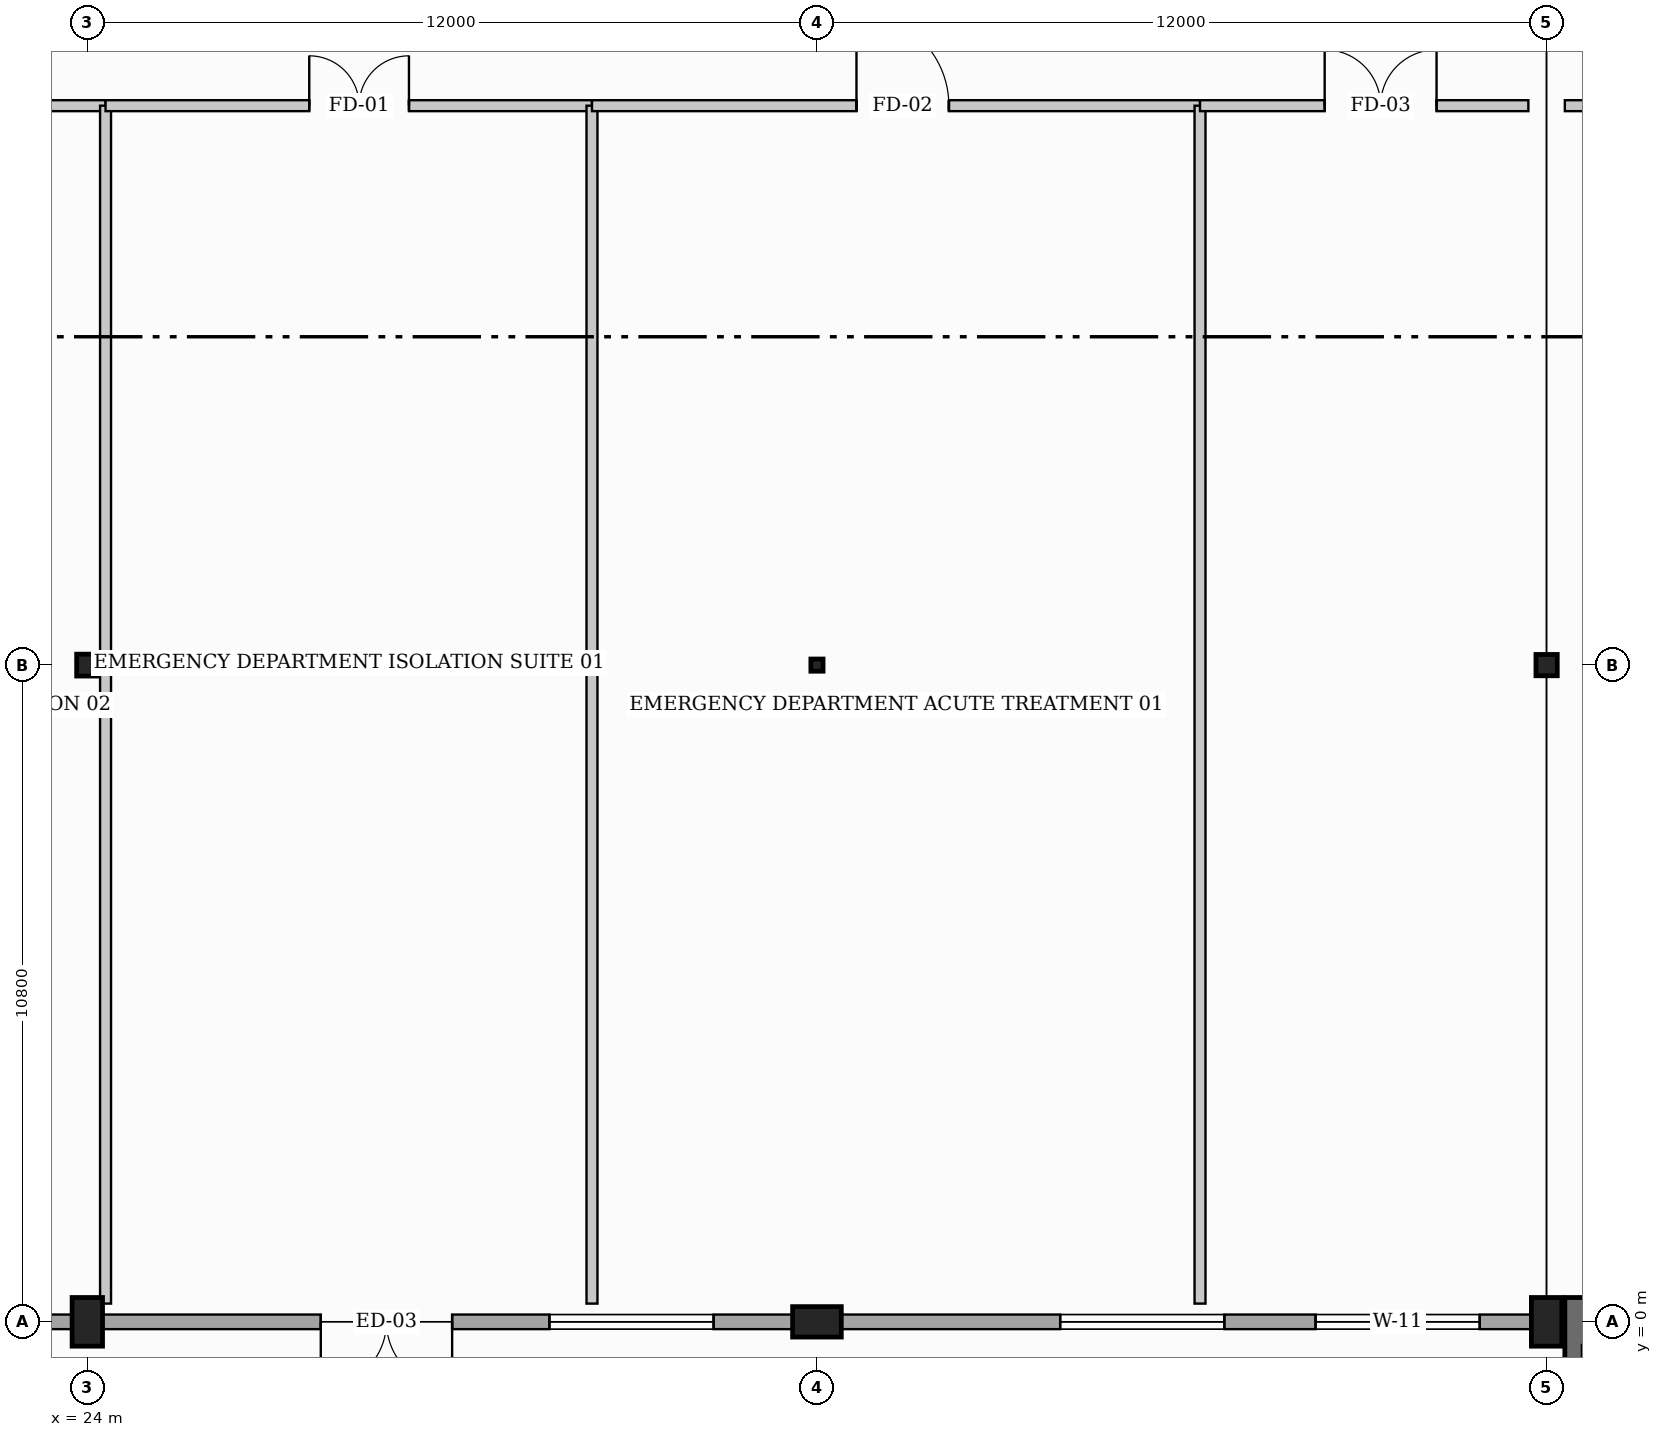
"""IFC4 building model, lengths in metres.
Left out: names, types, materials, properties, quantities, classifications, styles, units other than length and angle.
Written with IfcOpenShell. Run it as: python <this file> out.ifc"""

import sys

from ifc_helpers import new_model, si_unit, direction, frame, frame_2d, origin, origin_2d, place, context, subcontext, project, spatial, rectangle, hollow_rectangle, i_section, extrude, element, fill, save


model = new_model("IFC4")
c1 = context("Model", 3, precision=1e-05, world=origin(), true_north=direction((0.0, 1.0)))
c2 = subcontext(c1, "Body", "Model", "MODEL_VIEW")
j1 = project(units=[si_unit("LENGTHUNIT", "METRE"), si_unit("PLANEANGLEUNIT", "RADIAN")], contexts=[c1])
p1 = place(None, origin())
s1 = spatial("IfcSite", under=j1, at=p1, CompositionType="ELEMENT")
p2 = place(p1, origin())
s2 = spatial("IfcBuilding", under=s1, at=p2, CompositionType="ELEMENT")
p3 = place(p2, frame((0.0, 0.0, -4.8)))
s3 = spatial("IfcBuildingStorey", under=s2, at=p3, CompositionType="ELEMENT", Elevation=-4.8)
p4 = place(p3, frame((48.5, -4.2, 0.0), z_axis=(0.0, 0.0, 1.0), x_axis=(0.0, 1.0, 0.0)))
e1 = element("IfcWall", 1, at=p4, inside=s3, PredefinedType="USERDEFINED", context=c2, shape_type="SweptSolid", body=[
    extrude(rectangle(XDim=4.6, YDim=0.4, at=frame_2d((2.3, 0.0))), origin(), (0.0, 0.0, 1.0), 2.4),
])
p5 = place(p3, frame((24.0, 0.0, 0.0), z_axis=(0.0, 0.0, 1.0), x_axis=(1.0, 0.0, 0.0)))
e2 = element("IfcColumn", 2, at=p5, inside=s3, PredefinedType="PILASTER", context=c2, shape_type="SweptSolid", body=[
    extrude(rectangle(XDim=0.5, YDim=0.8, at=origin_2d()), origin(), (0.0, 0.0, 1.0), 4.8),
])
p6 = place(p3, frame((24.0, 10.8, 0.0), z_axis=(0.0, 0.0, 1.0), x_axis=(1.0, 0.0, 0.0)))
e3 = element("IfcColumn", 3, at=p6, inside=s3, PredefinedType="COLUMN", context=c2, shape_type="SweptSolid", body=[
    extrude(i_section(OverallWidth=0.35, OverallDepth=0.36, WebThickness=0.016, FlangeThickness=0.028, at=origin_2d()), origin(), (0.0, 0.0, 1.0), 4.8),
])
p7 = place(p3, frame((36.0, 0.0, 0.0), z_axis=(0.0, 0.0, 1.0), x_axis=(0.0, 1.0, 0.0)))
e4 = element("IfcColumn", 4, at=p7, inside=s3, PredefinedType="PILASTER", context=c2, shape_type="SweptSolid", body=[
    extrude(rectangle(XDim=0.5, YDim=0.8, at=origin_2d()), origin(), (0.0, 0.0, 1.0), 4.8),
])
p8 = place(p3, frame((36.0, 10.8, 0.0), z_axis=(0.0, 0.0, 1.0), x_axis=(0.0, 1.0, 0.0)))
e5 = element("IfcColumn", 5, at=p8, inside=s3, PredefinedType="COLUMN", context=c2, shape_type="SweptSolid", body=[
    extrude(hollow_rectangle(XDim=0.2, YDim=0.2, WallThickness=0.01, at=origin_2d()), origin(), (0.0, 0.0, 1.0), 4.8),
])
p9 = place(p3, frame((48.0, 0.0, 0.0), z_axis=(0.0, 0.0, 1.0), x_axis=(1.0, 0.0, 0.0)))
e6 = element("IfcColumn", 6, at=p9, inside=s3, PredefinedType="PILASTER", context=c2, shape_type="SweptSolid", body=[
    extrude(rectangle(XDim=0.5, YDim=0.8, at=origin_2d()), origin(), (0.0, 0.0, 1.0), 4.8),
])
p10 = place(p3, frame((48.0, 10.8, 0.0), z_axis=(0.0, 0.0, 1.0), x_axis=(1.0, 0.0, 0.0)))
e7 = element("IfcColumn", 7, at=p10, inside=s3, PredefinedType="COLUMN", context=c2, shape_type="SweptSolid", body=[
    extrude(i_section(OverallWidth=0.35, OverallDepth=0.35, WebThickness=0.014, FlangeThickness=0.024, at=origin_2d()), origin(), (0.0, 0.0, 1.0), 4.8),
])
p11 = place(p3, frame((48.0, 0.0, 0.0), z_axis=(0.0, 0.0, 1.0), x_axis=(-1.0, 0.0, 0.0)))
e8 = element("IfcWall", 8, at=p11, inside=s3, PredefinedType="STANDARD", context=c2, shape_type="SweptSolid", body=[
    extrude(rectangle(XDim=48.0, YDim=0.24, at=frame_2d((24.0, 0.0))), origin(), (0.0, 0.0, 1.0), 3.813),
])
p12 = place(p11, frame((18.0, 0.0, 0.0)))
e9 = element("IfcOpeningElement", 9, at=p12, cuts=e8, PredefinedType="OPENING", context=c2, shape_type="SweptSolid", body=[
    extrude(rectangle(XDim=2.16, YDim=2.2, at=frame_2d((1.08, 1.1))), frame((0.0, 0.13, 0.0), z_axis=(0.0, -1.0, 0.0), x_axis=(1.0, 0.0, 0.0)), (0.0, 0.0, 1.0), 0.26),
])
p13 = place(p11, frame((1.1, 0.0, 1.0)))
e10 = element("IfcOpeningElement", 10, at=p13, cuts=e8, PredefinedType="OPENING", context=c2, shape_type="SweptSolid", body=[
    extrude(rectangle(XDim=2.7, YDim=1.8, at=frame_2d((1.35, 0.9))), frame((0.0, 0.13, 0.0), z_axis=(0.0, -1.0, 0.0), x_axis=(1.0, 0.0, 0.0)), (0.0, 0.0, 1.0), 0.26),
])
p14 = place(p11, frame((5.3, 0.0, 1.0)))
e11 = element("IfcOpeningElement", 11, at=p14, cuts=e8, PredefinedType="OPENING", context=c2, shape_type="SweptSolid", body=[
    extrude(rectangle(XDim=2.7, YDim=1.8, at=frame_2d((1.35, 0.9))), frame((0.0, 0.13, 0.0), z_axis=(0.0, -1.0, 0.0), x_axis=(1.0, 0.0, 0.0)), (0.0, 0.0, 1.0), 0.26),
])
p15 = place(p11, frame((13.7, 0.0, 1.0)))
e12 = element("IfcOpeningElement", 12, at=p15, cuts=e8, PredefinedType="OPENING", context=c2, shape_type="SweptSolid", body=[
    extrude(rectangle(XDim=2.7, YDim=1.8, at=frame_2d((1.35, 0.9))), frame((0.0, 0.13, 0.0), z_axis=(0.0, -1.0, 0.0), x_axis=(1.0, 0.0, 0.0)), (0.0, 0.0, 1.0), 0.26),
])
p16 = place(p11, frame((26.3, 0.0, 1.0)))
e13 = element("IfcOpeningElement", 13, at=p16, cuts=e8, PredefinedType="OPENING", context=c2, shape_type="SweptSolid", body=[
    extrude(rectangle(XDim=2.7, YDim=1.8, at=frame_2d((1.35, 0.9))), frame((0.0, 0.13, 0.0), z_axis=(0.0, -1.0, 0.0), x_axis=(1.0, 0.0, 0.0)), (0.0, 0.0, 1.0), 0.26),
])
p17 = place(p11, frame((30.5, 0.0, 1.0)))
e14 = element("IfcOpeningElement", 14, at=p17, cuts=e8, PredefinedType="OPENING", context=c2, shape_type="SweptSolid", body=[
    extrude(rectangle(XDim=2.7, YDim=1.8, at=frame_2d((1.35, 0.9))), frame((0.0, 0.13, 0.0), z_axis=(0.0, -1.0, 0.0), x_axis=(1.0, 0.0, 0.0)), (0.0, 0.0, 1.0), 0.26),
])
p18 = place(p11, frame((38.9, 0.0, 1.0)))
e15 = element("IfcOpeningElement", 15, at=p18, cuts=e8, PredefinedType="OPENING", context=c2, shape_type="SweptSolid", body=[
    extrude(rectangle(XDim=2.7, YDim=1.8, at=frame_2d((1.35, 0.9))), frame((0.0, 0.13, 0.0), z_axis=(0.0, -1.0, 0.0), x_axis=(1.0, 0.0, 0.0)), (0.0, 0.0, 1.0), 0.26),
])
p19 = place(p11, frame((43.1, 0.0, 1.0)))
e16 = element("IfcOpeningElement", 16, at=p19, cuts=e8, PredefinedType="OPENING", context=c2, shape_type="SweptSolid", body=[
    extrude(rectangle(XDim=2.7, YDim=1.8, at=frame_2d((1.35, 0.9))), frame((0.0, 0.13, 0.0), z_axis=(0.0, -1.0, 0.0), x_axis=(1.0, 0.0, 0.0)), (0.0, 0.0, 1.0), 0.26),
])
p20 = place(p3, frame((16.3, 20.0, 0.0), z_axis=(0.0, 0.0, 1.0), x_axis=(1.0, 0.0, 0.0)))
e17 = element("IfcWall", 17, at=p20, inside=s3, PredefinedType="PARTITIONING", context=c2, shape_type="SweptSolid", body=[
    extrude(rectangle(XDim=8.0, YDim=0.18, at=frame_2d((4.0, 0.0))), origin(), (0.0, 0.0, 1.0), 3.887),
])
p21 = place(p20, frame((3.35, 0.0, 0.0)))
e18 = element("IfcOpeningElement", 18, at=p21, cuts=e17, PredefinedType="OPENING", context=c2, shape_type="SweptSolid", body=[
    extrude(rectangle(XDim=1.16, YDim=2.1, at=frame_2d((0.58, 1.05))), frame((0.0, 0.1, 0.0), z_axis=(0.0, -1.0, 0.0), x_axis=(1.0, 0.0, 0.0)), (0.0, 0.0, 1.0), 0.2),
])
p22 = place(p3, frame((24.3, 0.3, 0.0), z_axis=(0.0, 0.0, 1.0), x_axis=(0.0, 1.0, 0.0)))
e19 = element("IfcWall", 19, at=p22, inside=s3, PredefinedType="PARTITIONING", context=c2, shape_type="SweptSolid", body=[
    extrude(rectangle(XDim=19.7, YDim=0.18, at=frame_2d((9.85, 0.0))), origin(), (0.0, 0.0, 1.0), 3.803),
])
p23 = place(p3, frame((24.3, 20.0, 0.0), z_axis=(0.0, 0.0, 1.0), x_axis=(1.0, 0.0, 0.0)))
e20 = element("IfcWall", 20, at=p23, inside=s3, PredefinedType="PARTITIONING", context=c2, shape_type="SweptSolid", body=[
    extrude(rectangle(XDim=8.0, YDim=0.18, at=frame_2d((4.0, 0.0))), origin(), (0.0, 0.0, 1.0), 3.887),
])
p24 = place(p23, frame((3.35, 0.0, 0.0)))
e21 = element("IfcOpeningElement", 21, at=p24, cuts=e20, PredefinedType="OPENING", context=c2, shape_type="SweptSolid", body=[
    extrude(rectangle(XDim=1.64, YDim=2.2, at=frame_2d((0.82, 1.1))), frame((0.0, 0.1, 0.0), z_axis=(0.0, -1.0, 0.0), x_axis=(1.0, 0.0, 0.0)), (0.0, 0.0, 1.0), 0.2),
])
p25 = place(p3, frame((32.3, 0.3, 0.0), z_axis=(0.0, 0.0, 1.0), x_axis=(0.0, 1.0, 0.0)))
e22 = element("IfcWall", 22, at=p25, inside=s3, PredefinedType="PARTITIONING", context=c2, shape_type="SweptSolid", body=[
    extrude(rectangle(XDim=19.7, YDim=0.18, at=frame_2d((9.85, 0.0))), origin(), (0.0, 0.0, 1.0), 3.808),
])
p26 = place(p3, frame((32.3, 20.0, 0.0), z_axis=(0.0, 0.0, 1.0), x_axis=(1.0, 0.0, 0.0)))
e23 = element("IfcWall", 23, at=p26, inside=s3, PredefinedType="PARTITIONING", context=c2, shape_type="SweptSolid", body=[
    extrude(rectangle(XDim=10.0, YDim=0.18, at=frame_2d((5.0, 0.0))), origin(), (0.0, 0.0, 1.0), 3.955),
])
p27 = place(p26, frame((4.35, 0.0, 0.0)))
e24 = element("IfcOpeningElement", 24, at=p27, cuts=e23, PredefinedType="OPENING", context=c2, shape_type="SweptSolid", body=[
    extrude(rectangle(XDim=1.52, YDim=2.16, at=frame_2d((0.76, 1.08))), frame((0.0, 0.1, 0.0), z_axis=(0.0, -1.0, 0.0), x_axis=(1.0, 0.0, 0.0)), (0.0, 0.0, 1.0), 0.2),
])
p28 = place(p3, frame((42.3, 0.3, 0.0), z_axis=(0.0, 0.0, 1.0), x_axis=(0.0, 1.0, 0.0)))
e25 = element("IfcWall", 25, at=p28, inside=s3, PredefinedType="PARTITIONING", context=c2, shape_type="SweptSolid", body=[
    extrude(rectangle(XDim=19.7, YDim=0.18, at=frame_2d((9.85, 0.0))), origin(), (0.0, 0.0, 1.0), 3.813),
])
p29 = place(p3, frame((42.3, 20.0, 0.0), z_axis=(0.0, 0.0, 1.0), x_axis=(1.0, 0.0, 0.0)))
e26 = element("IfcWall", 26, at=p29, inside=s3, PredefinedType="PARTITIONING", context=c2, shape_type="SweptSolid", body=[
    extrude(rectangle(XDim=5.4, YDim=0.18, at=frame_2d((2.7, 0.0))), origin(), (0.0, 0.0, 1.0), 3.958),
])
p30 = place(p29, frame((2.05, 0.0, 0.0)))
e27 = element("IfcOpeningElement", 27, at=p30, cuts=e26, PredefinedType="OPENING", context=c2, shape_type="SweptSolid", body=[
    extrude(rectangle(XDim=1.84, YDim=2.22, at=frame_2d((0.92, 1.11))), frame((0.0, 0.1, 0.0), z_axis=(0.0, -1.0, 0.0), x_axis=(1.0, 0.0, 0.0)), (0.0, 0.0, 1.0), 0.2),
])
p31 = place(p3, frame((48.3, 20.0, 0.0), z_axis=(0.0, 0.0, 1.0), x_axis=(1.0, 0.0, 0.0)))
e28 = element("IfcWall", 28, at=p31, inside=s3, PredefinedType="PARTITIONING", context=c2, shape_type="SweptSolid", body=[
    extrude(rectangle(XDim=13.65, YDim=0.18, at=frame_2d((6.825, 0.0))), origin(), (0.0, 0.0, 1.0), 3.958),
])
p32 = place(p31, frame((6.175, 0.0, 0.0)))
e29 = element("IfcOpeningElement", 29, at=p32, cuts=e28, PredefinedType="OPENING", context=c2, shape_type="SweptSolid", body=[
    extrude(rectangle(XDim=1.84, YDim=2.22, at=frame_2d((0.92, 1.11))), frame((0.0, 0.1, 0.0), z_axis=(0.0, -1.0, 0.0), x_axis=(1.0, 0.0, 0.0)), (0.0, 0.0, 1.0), 0.2),
])
p33 = place(p12, origin())
e30 = element("IfcDoor", 30, at=p33, inside=s3, OperationType="DOUBLE_DOOR_SINGLE_SWING", PredefinedType="DOOR", context=c2, shape_type="SweptSolid", body=[
    extrude(rectangle(XDim=2.16, YDim=2.2, at=frame_2d((1.08, 1.1))), frame((0.0, 0.025, 0.0), z_axis=(0.0, -1.0, 0.0), x_axis=(1.0, 0.0, 0.0)), (0.0, 0.0, 1.0), 0.05),
])
fill(e9, e30)
p34 = place(p13, origin())
e31 = element("IfcWindow", 31, at=p34, inside=s3, PartitioningType="TRIPLE_PANEL_VERTICAL", PredefinedType="WINDOW", context=c2, shape_type="SweptSolid", body=[
    extrude(rectangle(XDim=2.7, YDim=1.8, at=frame_2d((1.35, 0.9))), frame((0.0, 0.03, 0.0), z_axis=(0.0, -1.0, 0.0), x_axis=(1.0, 0.0, 0.0)), (0.0, 0.0, 1.0), 0.06),
])
fill(e10, e31)
p35 = place(p14, origin())
e32 = element("IfcWindow", 32, at=p35, inside=s3, PartitioningType="TRIPLE_PANEL_VERTICAL", PredefinedType="WINDOW", context=c2, shape_type="SweptSolid", body=[
    extrude(rectangle(XDim=2.7, YDim=1.8, at=frame_2d((1.35, 0.9))), frame((0.0, 0.03, 0.0), z_axis=(0.0, -1.0, 0.0), x_axis=(1.0, 0.0, 0.0)), (0.0, 0.0, 1.0), 0.06),
])
fill(e11, e32)
p36 = place(p15, origin())
e33 = element("IfcWindow", 33, at=p36, inside=s3, PartitioningType="TRIPLE_PANEL_VERTICAL", PredefinedType="WINDOW", context=c2, shape_type="SweptSolid", body=[
    extrude(rectangle(XDim=2.7, YDim=1.8, at=frame_2d((1.35, 0.9))), frame((0.0, 0.03, 0.0), z_axis=(0.0, -1.0, 0.0), x_axis=(1.0, 0.0, 0.0)), (0.0, 0.0, 1.0), 0.06),
])
fill(e12, e33)
p37 = place(p24, origin())
e34 = element("IfcDoor", 34, at=p37, inside=s3, OperationType="DOUBLE_DOOR_SINGLE_SWING", PredefinedType="DOOR", context=c2, shape_type="SweptSolid", body=[
    extrude(rectangle(XDim=1.64, YDim=2.2, at=frame_2d((0.82, 1.1))), frame((0.0, 0.025, 0.0), z_axis=(0.0, -1.0, 0.0), x_axis=(1.0, 0.0, 0.0)), (0.0, 0.0, 1.0), 0.05),
])
fill(e21, e34)
p38 = place(p27, origin())
e35 = element("IfcDoor", 35, at=p38, inside=s3, OperationType="SINGLE_SWING_LEFT", PredefinedType="DOOR", context=c2, shape_type="SweptSolid", body=[
    extrude(rectangle(XDim=1.52, YDim=2.16, at=frame_2d((0.76, 1.08))), frame((0.0, 0.025, 0.0), z_axis=(0.0, -1.0, 0.0), x_axis=(1.0, 0.0, 0.0)), (0.0, 0.0, 1.0), 0.05),
])
fill(e24, e35)
p39 = place(p30, origin())
e36 = element("IfcDoor", 36, at=p39, inside=s3, OperationType="DOUBLE_DOOR_SINGLE_SWING", PredefinedType="DOOR", context=c2, shape_type="SweptSolid", body=[
    extrude(rectangle(XDim=1.84, YDim=2.22, at=frame_2d((0.92, 1.11))), frame((0.0, 0.025, 0.0), z_axis=(0.0, -1.0, 0.0), x_axis=(1.0, 0.0, 0.0)), (0.0, 0.0, 1.0), 0.05),
])
fill(e27, e36)
save(model, sys.argv[1])
